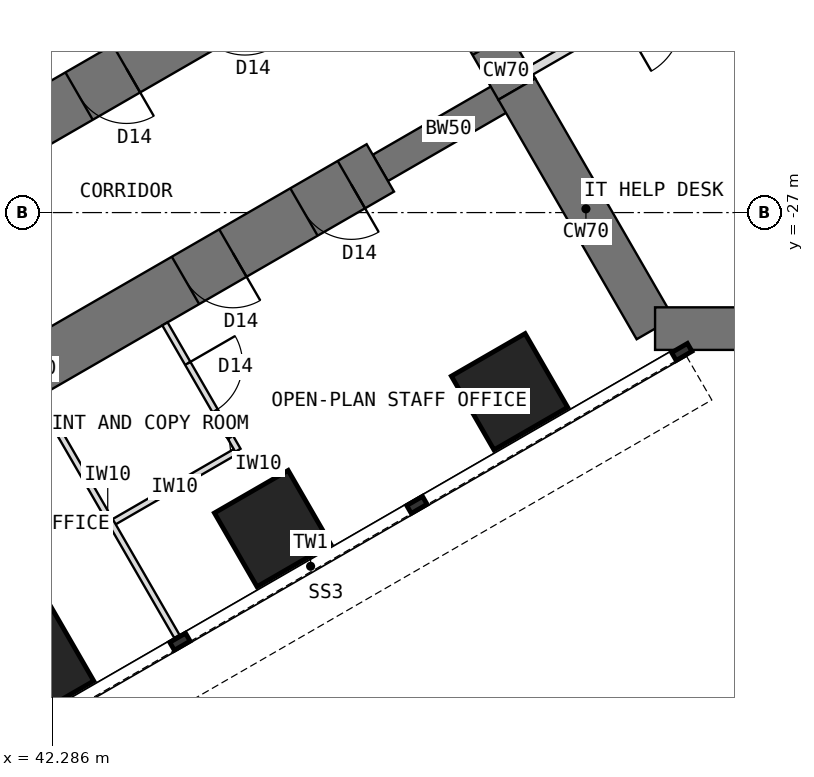
"""IFC4 building model, lengths in metres.
Left out: names, types, materials, properties, quantities, classifications, styles, units other than length and angle.
Written with IfcOpenShell. Run it as: python <this file> out.ifc"""

import sys

from ifc_helpers import new_model, si_unit, direction, frame, frame_2d, origin, origin_2d, place, context, subcontext, project, spatial, rectangle, extrude, element, fill, save


model = new_model("IFC4")
c1 = context("Model", 3, precision=1e-05, world=origin(), true_north=direction((0.0, 1.0)))
c2 = subcontext(c1, "Body", "Model", "MODEL_VIEW")
j1 = project(units=[si_unit("LENGTHUNIT", "METRE"), si_unit("PLANEANGLEUNIT", "RADIAN")], contexts=[c1])
p1 = place(None, origin())
s1 = spatial("IfcSite", under=j1, at=p1, CompositionType="ELEMENT")
p2 = place(p1, origin())
s2 = spatial("IfcBuilding", under=s1, at=p2, CompositionType="ELEMENT")
p3 = place(p2, frame((0.0, 0.0, 76.5)))
s3 = spatial("IfcBuildingStorey", under=s2, at=p3, CompositionType="ELEMENT", Elevation=76.5)
p4 = place(p3, frame((48.178, -21.939, 0.0), z_axis=(0.0, 0.0, 1.0), x_axis=(0.500010275428, -0.866019471182, 0.0)))
e1 = element("IfcWall", 1, at=p4, inside=s3, PredefinedType="SHEAR", context=c2, shape_type="SweptSolid", body=[
    extrude(rectangle(XDim=3.5, YDim=0.7, at=frame_2d((1.75, 0.0))), origin(), (0.0, 0.0, 1.0), 4.0),
])
p5 = place(p4, frame((0.85, 0.0, 0.0)))
e2 = element("IfcOpeningElement", 2, at=p5, cuts=e1, PredefinedType="OPENING", context=c2, shape_type="SweptSolid", body=[
    extrude(rectangle(XDim=1.8, YDim=2.1, at=frame_2d((0.9, 1.05))), frame((0.0, 0.36, 0.0), z_axis=(0.0, -1.0, 0.0), x_axis=(1.0, 0.0, 0.0)), (0.0, 0.0, 1.0), 0.72),
])
p6 = place(p3, frame((49.928, -24.97, 0.0), z_axis=(0.0, 0.0, 1.0), x_axis=(0.499984222037, -0.866034513004, 0.0)))
e3 = element("IfcWall", 3, at=p6, inside=s3, PredefinedType="SHEAR", context=c2, shape_type="SweptSolid", body=[
    extrude(rectangle(XDim=4.548, YDim=0.7, at=frame_2d((2.274, 0.0))), origin(), (0.0, 0.0, 1.0), 4.0),
])
p7 = place(p3, frame((52.202, -28.908, 0.0), z_axis=(0.0, 0.0, 1.0), x_axis=(1.0, 0.0, 0.0)))
e4 = element("IfcWall", 4, at=p7, inside=s3, PredefinedType="SHEAR", context=c2, shape_type="SweptSolid", body=[
    extrude(rectangle(XDim=12.596, YDim=0.7, at=frame_2d((6.298, 0.0))), origin(), (0.0, 0.0, 1.0), 4.0),
])
p8 = place(p3, frame((49.928, -24.97, 0.0), z_axis=(0.0, 0.0, 1.0), x_axis=(-0.866031863473, -0.499988811324, 0.0)))
e5 = element("IfcWall", 5, at=p8, inside=s3, PredefinedType="SHEAR", context=c2, shape_type="SweptSolid", body=[
    extrude(rectangle(XDim=2.592, YDim=0.5, at=frame_2d((1.296, 0.0))), origin(), (0.0, 0.0, 1.0), 4.0),
])
p9 = place(p3, frame((47.684, -26.266, 0.0), z_axis=(0.0, 0.0, 1.0), x_axis=(-0.866027579429, -0.499996231654, 0.0)))
e6 = element("IfcWall", 6, at=p9, inside=s3, PredefinedType="SHEAR", context=c2, shape_type="SweptSolid", body=[
    extrude(rectangle(XDim=13.2, YDim=0.9, at=frame_2d((6.6, 0.0))), origin(), (0.0, 0.0, 1.0), 4.0),
])
p10 = place(p9, frame((0.55, 0.0, 0.0)))
e7 = element("IfcOpeningElement", 7, at=p10, cuts=e6, PredefinedType="OPENING", context=c2, shape_type="SweptSolid", body=[
    extrude(rectangle(XDim=0.9, YDim=2.1, at=frame_2d((0.45, 1.05))), frame((0.0, 0.46, 0.0), z_axis=(0.0, -1.0, 0.0), x_axis=(1.0, 0.0, 0.0)), (0.0, 0.0, 1.0), 0.92),
])
p11 = place(p9, frame((2.8, 0.0, 0.0)))
e8 = element("IfcOpeningElement", 8, at=p11, cuts=e6, PredefinedType="OPENING", context=c2, shape_type="SweptSolid", body=[
    extrude(rectangle(XDim=0.9, YDim=2.1, at=frame_2d((0.45, 1.05))), frame((0.0, 0.46, 0.0), z_axis=(0.0, -1.0, 0.0), x_axis=(1.0, 0.0, 0.0)), (0.0, 0.0, 1.0), 0.92),
])
p12 = place(p9, frame((7.3, 0.0, 0.0)))
e9 = element("IfcOpeningElement", 9, at=p12, cuts=e6, PredefinedType="OPENING", context=c2, shape_type="SweptSolid", body=[
    extrude(rectangle(XDim=0.9, YDim=2.1, at=frame_2d((0.45, 1.05))), frame((0.0, 0.46, 0.0), z_axis=(0.0, -1.0, 0.0), x_axis=(1.0, 0.0, 0.0)), (0.0, 0.0, 1.0), 0.92),
])
p13 = place(p3, frame((45.934, -23.234, 0.0), z_axis=(0.0, 0.0, 1.0), x_axis=(-0.866019570528, -0.500010103361, 0.0)))
e10 = element("IfcWall", 10, at=p13, inside=s3, PredefinedType="SHEAR", context=c2, shape_type="SweptSolid", body=[
    extrude(rectangle(XDim=13.2, YDim=0.9, at=frame_2d((6.6, 0.0))), origin(), (0.0, 0.0, 1.0), 4.0),
])
p14 = place(p13, frame((0.55, 0.0, 0.0)))
e11 = element("IfcOpeningElement", 11, at=p14, cuts=e10, PredefinedType="OPENING", context=c2, shape_type="SweptSolid", body=[
    extrude(rectangle(XDim=0.9, YDim=2.1, at=frame_2d((0.45, 1.05))), frame((0.0, 0.46, 0.0), z_axis=(0.0, -1.0, 0.0), x_axis=(1.0, 0.0, 0.0)), (0.0, 0.0, 1.0), 0.92),
])
p15 = place(p13, frame((2.8, 0.0, 0.0)))
e12 = element("IfcOpeningElement", 12, at=p15, cuts=e10, PredefinedType="OPENING", context=c2, shape_type="SweptSolid", body=[
    extrude(rectangle(XDim=0.9, YDim=2.1, at=frame_2d((0.45, 1.05))), frame((0.0, 0.46, 0.0), z_axis=(0.0, -1.0, 0.0), x_axis=(1.0, 0.0, 0.0)), (0.0, 0.0, 1.0), 0.92),
])
p16 = place(p13, frame((7.3, 0.0, 0.0)))
e13 = element("IfcOpeningElement", 13, at=p16, cuts=e10, PredefinedType="OPENING", context=c2, shape_type="SweptSolid", body=[
    extrude(rectangle(XDim=0.9, YDim=2.1, at=frame_2d((0.45, 1.05))), frame((0.0, 0.46, 0.0), z_axis=(0.0, -1.0, 0.0), x_axis=(1.0, 0.0, 0.0)), (0.0, 0.0, 1.0), 0.92),
])
for number, where, z_axis, x_axis in (
    (14, (49.809, -29.946, 0.0), (0.0, 0.0, 1.0), (0.866, 0.5, 0.0)),
    (15, (45.912, -32.196, 0.0), (0.0, 0.0, 1.0), (0.866, 0.5, 0.0)),
    (16, (42.014, -34.446, 0.0), (0.0, 0.0, 1.0), (0.866, 0.5, 0.0)),
):
    element("IfcColumn", number, at=place(p3, frame(where, z_axis=z_axis, x_axis=x_axis)), inside=s3, PredefinedType="COLUMN", context=c2, shape_type="SweptSolid", body=[
        extrude(rectangle(XDim=1.4, YDim=1.4, at=origin_2d()), origin(), (0.0, 0.0, 1.0), 4.0),
    ])
p17 = place(p3, frame((42.063, -30.03, 0.0), z_axis=(0.0, 0.0, 1.0), x_axis=(0.499982560684, -0.866035472144, 0.0)))
e17 = element("IfcWall", 17, at=p17, inside=s3, PredefinedType="PARTITIONING", context=c2, shape_type="SweptSolid", body=[
    extrude(rectangle(XDim=4.55, YDim=0.1, at=frame_2d((2.275, 0.0))), origin(), (0.0, 0.0, 1.0), 3.8),
])
p18 = place(p3, frame((45.342, -30.909, 0.0), z_axis=(0.0, 0.0, 1.0), x_axis=(-0.866050077142, -0.499957262057, 0.0)))
e18 = element("IfcWall", 18, at=p18, inside=s3, PredefinedType="PARTITIONING", context=c2, shape_type="SweptSolid", body=[
    extrude(rectangle(XDim=2.4, YDim=0.1, at=frame_2d((1.2, 0.0))), origin(), (0.0, 0.0, 1.0), 3.8),
])
p19 = place(p3, frame((44.141, -28.83, 0.0), z_axis=(0.0, 0.0, 1.0), x_axis=(0.500077600433, -0.865980596518, 0.0)))
e19 = element("IfcWall", 19, at=p19, inside=s3, PredefinedType="PARTITIONING", context=c2, shape_type="SweptSolid", body=[
    extrude(rectangle(XDim=2.4, YDim=0.1, at=frame_2d((1.2, 0.0))), origin(), (0.0, 0.0, 1.0), 3.8),
])
p20 = place(p19, frame((0.75, 0.0, 0.0)))
e20 = element("IfcOpeningElement", 20, at=p20, cuts=e19, PredefinedType="OPENING", context=c2, shape_type="SweptSolid", body=[
    extrude(rectangle(XDim=0.9, YDim=2.1, at=frame_2d((0.45, 1.05))), frame((0.0, 0.06, 0.0), z_axis=(0.0, -1.0, 0.0), x_axis=(1.0, 0.0, 0.0)), (0.0, 0.0, 1.0), 0.12),
])
p21 = place(p3, frame((54.017, -22.436, 0.0), z_axis=(0.0, 0.0, 1.0), x_axis=(-0.866015446554, -0.500017246033, 0.0)))
e21 = element("IfcWall", 21, at=p21, inside=s3, PredefinedType="PARTITIONING", context=c2, shape_type="SweptSolid", body=[
    extrude(rectangle(XDim=4.469, YDim=0.15, at=frame_2d((2.234, 0.0))), origin(), (0.0, 0.0, 1.0), 3.8),
])
p22 = place(p21, frame((1.744, 0.0, 0.0)))
e22 = element("IfcOpeningElement", 22, at=p22, cuts=e21, PredefinedType="OPENING", context=c2, shape_type="SweptSolid", body=[
    extrude(rectangle(XDim=1.0, YDim=2.1, at=frame_2d((0.5, 1.05))), frame((0.0, 0.085, 0.0), z_axis=(0.0, -1.0, 0.0), x_axis=(1.0, 0.0, 0.0)), (0.0, 0.0, 1.0), 0.17),
])
p23 = place(p5, origin())
e23 = element("IfcDoor", 23, at=p23, inside=s3, OperationType="DOUBLE_DOOR_DOUBLE_SWING", PredefinedType="DOOR", context=c2, shape_type="SweptSolid", body=[
    extrude(rectangle(XDim=1.72, YDim=2.06, at=frame_2d((0.9, 1.03))), frame((0.0, 0.025, 0.0), z_axis=(0.0, -1.0, 0.0), x_axis=(1.0, 0.0, 0.0)), (0.0, 0.0, 1.0), 0.05),
    extrude(rectangle(XDim=0.04, YDim=2.1, at=frame_2d((0.02, 1.05))), frame((0.0, 0.35, 0.0), z_axis=(0.0, -1.0, 0.0), x_axis=(1.0, 0.0, 0.0)), (0.0, 0.0, 1.0), 0.699),
    extrude(rectangle(XDim=0.04, YDim=2.1, at=frame_2d((1.78, 1.05))), frame((0.0, 0.35, 0.0), z_axis=(0.0, -1.0, 0.0), x_axis=(1.0, 0.0, 0.0)), (0.0, 0.0, 1.0), 0.699),
    extrude(rectangle(XDim=1.72, YDim=0.04, at=frame_2d((0.9, 2.08))), frame((0.0, 0.35, 0.0), z_axis=(0.0, -1.0, 0.0), x_axis=(1.0, 0.0, 0.0)), (0.0, 0.0, 1.0), 0.699),
])
fill(e2, e23)
p24 = place(p20, origin())
e24 = element("IfcDoor", 24, at=p24, inside=s3, OperationType="SINGLE_SWING_LEFT", PredefinedType="DOOR", context=c2, shape_type="SweptSolid", body=[
    extrude(rectangle(XDim=0.9, YDim=2.1, at=frame_2d((0.45, 1.05))), frame((0.0, 0.025, 0.0), z_axis=(0.0, -1.0, 0.0), x_axis=(1.0, 0.0, 0.0)), (0.0, 0.0, 1.0), 0.05),
])
fill(e20, e24)
p25 = place(p10, origin())
e25 = element("IfcDoor", 25, at=p25, inside=s3, OperationType="SINGLE_SWING_LEFT", PredefinedType="DOOR", context=c2, shape_type="SweptSolid", body=[
    extrude(rectangle(XDim=0.82, YDim=2.06, at=frame_2d((0.45, 1.03))), frame((0.0, 0.025, 0.0), z_axis=(0.0, -1.0, 0.0), x_axis=(1.0, 0.0, 0.0)), (0.0, 0.0, 1.0), 0.05),
    extrude(rectangle(XDim=0.04, YDim=2.1, at=frame_2d((0.02, 1.05))), frame((0.0, 0.45, 0.0), z_axis=(0.0, -1.0, 0.0), x_axis=(1.0, 0.0, 0.0)), (0.0, 0.0, 1.0), 0.899),
    extrude(rectangle(XDim=0.04, YDim=2.1, at=frame_2d((0.88, 1.05))), frame((0.0, 0.45, 0.0), z_axis=(0.0, -1.0, 0.0), x_axis=(1.0, 0.0, 0.0)), (0.0, 0.0, 1.0), 0.899),
    extrude(rectangle(XDim=0.82, YDim=0.04, at=frame_2d((0.45, 2.08))), frame((0.0, 0.45, 0.0), z_axis=(0.0, -1.0, 0.0), x_axis=(1.0, 0.0, 0.0)), (0.0, 0.0, 1.0), 0.899),
])
fill(e7, e25)
p26 = place(p11, origin())
e26 = element("IfcDoor", 26, at=p26, inside=s3, OperationType="SINGLE_SWING_LEFT", PredefinedType="DOOR", context=c2, shape_type="SweptSolid", body=[
    extrude(rectangle(XDim=0.82, YDim=2.06, at=frame_2d((0.45, 1.03))), frame((0.0, 0.025, 0.0), z_axis=(0.0, -1.0, 0.0), x_axis=(1.0, 0.0, 0.0)), (0.0, 0.0, 1.0), 0.05),
    extrude(rectangle(XDim=0.04, YDim=2.1, at=frame_2d((0.02, 1.05))), frame((0.0, 0.45, 0.0), z_axis=(0.0, -1.0, 0.0), x_axis=(1.0, 0.0, 0.0)), (0.0, 0.0, 1.0), 0.899),
    extrude(rectangle(XDim=0.04, YDim=2.1, at=frame_2d((0.88, 1.05))), frame((0.0, 0.45, 0.0), z_axis=(0.0, -1.0, 0.0), x_axis=(1.0, 0.0, 0.0)), (0.0, 0.0, 1.0), 0.899),
    extrude(rectangle(XDim=0.82, YDim=0.04, at=frame_2d((0.45, 2.08))), frame((0.0, 0.45, 0.0), z_axis=(0.0, -1.0, 0.0), x_axis=(1.0, 0.0, 0.0)), (0.0, 0.0, 1.0), 0.899),
])
fill(e8, e26)
p27 = place(p15, origin())
e27 = element("IfcDoor", 27, at=p27, inside=s3, OperationType="SINGLE_SWING_LEFT", PredefinedType="DOOR", context=c2, shape_type="SweptSolid", body=[
    extrude(rectangle(XDim=0.82, YDim=2.06, at=frame_2d((0.45, 1.03))), frame((0.0, 0.025, 0.0), z_axis=(0.0, -1.0, 0.0), x_axis=(1.0, 0.0, 0.0)), (0.0, 0.0, 1.0), 0.05),
    extrude(rectangle(XDim=0.04, YDim=2.1, at=frame_2d((0.02, 1.05))), frame((0.0, 0.45, 0.0), z_axis=(0.0, -1.0, 0.0), x_axis=(1.0, 0.0, 0.0)), (0.0, 0.0, 1.0), 0.899),
    extrude(rectangle(XDim=0.04, YDim=2.1, at=frame_2d((0.88, 1.05))), frame((0.0, 0.45, 0.0), z_axis=(0.0, -1.0, 0.0), x_axis=(1.0, 0.0, 0.0)), (0.0, 0.0, 1.0), 0.899),
    extrude(rectangle(XDim=0.82, YDim=0.04, at=frame_2d((0.45, 2.08))), frame((0.0, 0.45, 0.0), z_axis=(0.0, -1.0, 0.0), x_axis=(1.0, 0.0, 0.0)), (0.0, 0.0, 1.0), 0.899),
])
fill(e12, e27)
save(model, sys.argv[1])
